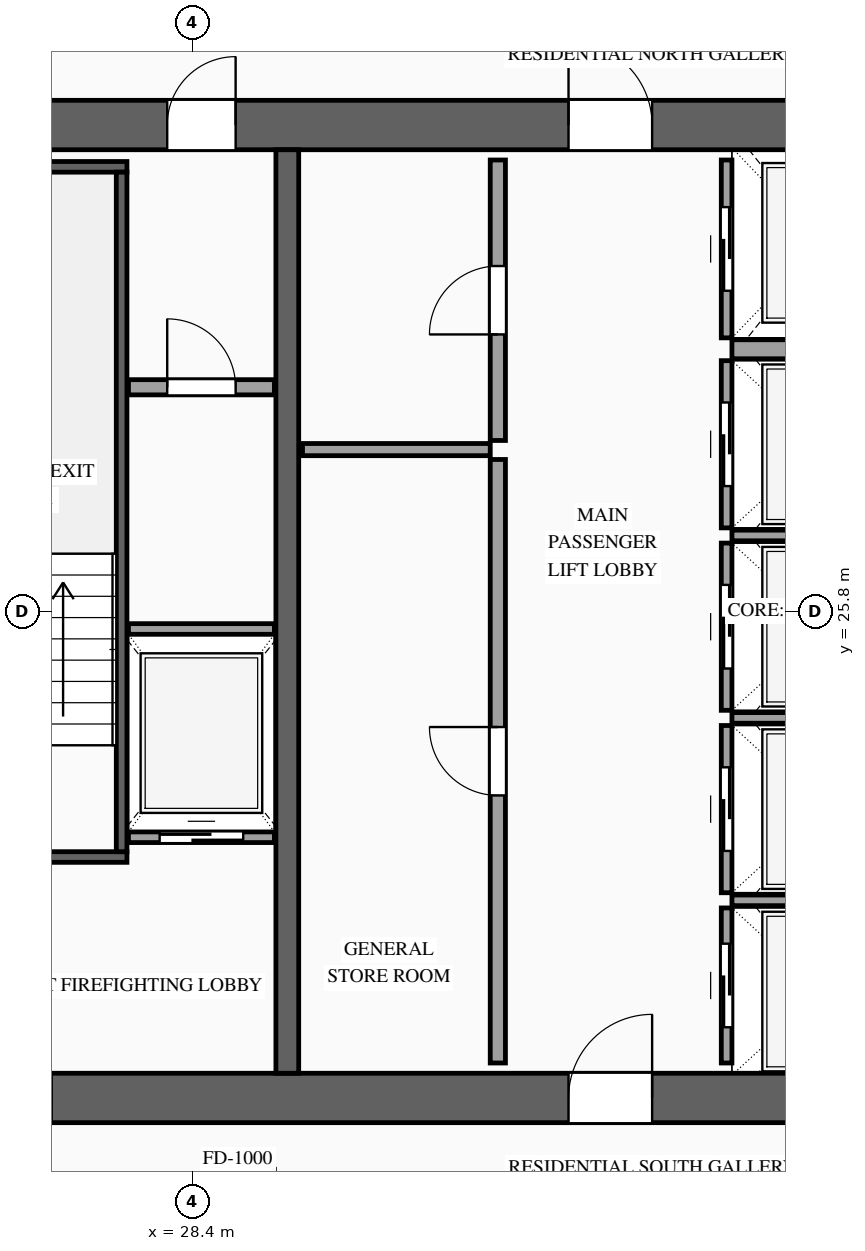
"""IFC4 building model, lengths in metres.
Left out: names, types, materials, properties, quantities, classifications, styles, units other than length and angle.
Written with IfcOpenShell. Run it as: python <this file> out.ifc"""

import sys

from ifc_helpers import new_model, si_unit, direction, frame, frame_2d, origin, place, context, subcontext, project, spatial, rectangle, extrude, source, transform, mapped, element, fill, save


model = new_model("IFC4")
c1 = context("Model", 3, precision=1e-05, world=origin(), true_north=direction((0.0, 1.0)))
c2 = subcontext(c1, "Body", "Model", "MODEL_VIEW")
j1 = project(units=[si_unit("LENGTHUNIT", "METRE"), si_unit("PLANEANGLEUNIT", "RADIAN")], contexts=[c1])
p1 = place(None, origin())
s1 = spatial("IfcSite", under=j1, at=p1, CompositionType="ELEMENT")
p2 = place(p1, origin())
s2 = spatial("IfcBuilding", under=s1, at=p2, CompositionType="ELEMENT")
p3 = place(p2, frame((0.0, 0.0, 191.5)))
s3 = spatial("IfcBuildingStorey", under=s2, at=p3, CompositionType="ELEMENT", Elevation=191.5)
p4 = place(p3, frame((23.475, 19.4, 0.0), z_axis=(0.0, 0.0, 1.0), x_axis=(1.0, 0.0, 0.0)))
e1 = element("IfcWall", 1, at=p4, inside=s3, PredefinedType="SHEAR", context=c2, shape_type="SweptSolid", body=[
    extrude(rectangle(XDim=27.05, YDim=0.65, at=frame_2d((13.525, 0.0))), origin(), (0.0, 0.0, 1.0), 3.5),
])
p5 = place(p4, frame((1.975, 0.0, 0.0)))
e2 = element("IfcOpeningElement", 2, at=p5, cuts=e1, PredefinedType="OPENING", context=c2, shape_type="SweptSolid", body=[
    extrude(rectangle(XDim=1.1, YDim=2.2, at=frame_2d((0.55, 1.1))), frame((0.0, 0.34, 0.0), z_axis=(0.0, -1.0, 0.0), x_axis=(1.0, 0.0, 0.0)), (0.0, 0.0, 1.0), 0.68),
])
p6 = place(p4, frame((9.875, 0.0, 0.0)))
e3 = element("IfcOpeningElement", 3, at=p6, cuts=e1, PredefinedType="OPENING", context=c2, shape_type="SweptSolid", body=[
    extrude(rectangle(XDim=1.1, YDim=2.2, at=frame_2d((0.55, 1.1))), frame((0.0, 0.34, 0.0), z_axis=(0.0, -1.0, 0.0), x_axis=(1.0, 0.0, 0.0)), (0.0, 0.0, 1.0), 0.68),
])
p7 = place(p4, frame((23.075, 0.0, 0.0)))
e4 = element("IfcOpeningElement", 4, at=p7, cuts=e1, PredefinedType="OPENING", context=c2, shape_type="SweptSolid", body=[
    extrude(rectangle(XDim=1.1, YDim=2.2, at=frame_2d((0.55, 1.1))), frame((0.0, 0.34, 0.0), z_axis=(0.0, -1.0, 0.0), x_axis=(1.0, 0.0, 0.0)), (0.0, 0.0, 1.0), 0.68),
])
p8 = place(p4, frame((19.695, 0.0, 0.0)))
e5 = element("IfcOpeningElement", 5, at=p8, cuts=e1, PredefinedType="OPENING", context=c2, shape_type="SweptSolid", body=[
    extrude(rectangle(XDim=0.9, YDim=2.15, at=frame_2d((0.45, 1.075))), frame((0.0, 0.34, 0.0), z_axis=(0.0, -1.0, 0.0), x_axis=(1.0, 0.0, 0.0)), (0.0, 0.0, 1.0), 0.68),
])
p9 = place(p4, frame((18.255, 0.0, 0.0)))
e6 = element("IfcOpeningElement", 6, at=p9, cuts=e1, PredefinedType="OPENING", context=c2, shape_type="SweptSolid", body=[
    extrude(rectangle(XDim=0.9, YDim=2.15, at=frame_2d((0.45, 1.075))), frame((0.0, 0.34, 0.0), z_axis=(0.0, -1.0, 0.0), x_axis=(1.0, 0.0, 0.0)), (0.0, 0.0, 1.0), 0.68),
])
p10 = place(p3, frame((23.475, 32.2, 0.0), z_axis=(0.0, 0.0, 1.0), x_axis=(1.0, 0.0, 0.0)))
e7 = element("IfcWall", 7, at=p10, inside=s3, PredefinedType="SHEAR", context=c2, shape_type="SweptSolid", body=[
    extrude(rectangle(XDim=27.05, YDim=0.65, at=frame_2d((13.525, 0.0))), origin(), (0.0, 0.0, 1.0), 3.5),
])
p11 = place(p10, frame((4.595, 0.0, 0.0)))
e8 = element("IfcOpeningElement", 8, at=p11, cuts=e7, PredefinedType="OPENING", context=c2, shape_type="SweptSolid", body=[
    extrude(rectangle(XDim=0.9, YDim=2.15, at=frame_2d((0.45, 1.075))), frame((0.0, 0.34, 0.0), z_axis=(0.0, -1.0, 0.0), x_axis=(1.0, 0.0, 0.0)), (0.0, 0.0, 1.0), 0.68),
])
p12 = place(p10, frame((9.875, 0.0, 0.0)))
e9 = element("IfcOpeningElement", 9, at=p12, cuts=e7, PredefinedType="OPENING", context=c2, shape_type="SweptSolid", body=[
    extrude(rectangle(XDim=1.1, YDim=2.2, at=frame_2d((0.55, 1.1))), frame((0.0, 0.34, 0.0), z_axis=(0.0, -1.0, 0.0), x_axis=(1.0, 0.0, 0.0)), (0.0, 0.0, 1.0), 0.68),
])
p13 = place(p10, frame((15.725, 0.0, 0.0)))
e10 = element("IfcOpeningElement", 10, at=p13, cuts=e7, PredefinedType="OPENING", context=c2, shape_type="SweptSolid", body=[
    extrude(rectangle(XDim=1.1, YDim=2.2, at=frame_2d((0.55, 1.1))), frame((0.0, 0.34, 0.0), z_axis=(0.0, -1.0, 0.0), x_axis=(1.0, 0.0, 0.0)), (0.0, 0.0, 1.0), 0.68),
])
p14 = place(p10, frame((18.255, 0.0, 0.0)))
e11 = element("IfcOpeningElement", 11, at=p14, cuts=e7, PredefinedType="OPENING", context=c2, shape_type="SweptSolid", body=[
    extrude(rectangle(XDim=0.9, YDim=2.15, at=frame_2d((0.45, 1.075))), frame((0.0, 0.34, 0.0), z_axis=(0.0, -1.0, 0.0), x_axis=(1.0, 0.0, 0.0)), (0.0, 0.0, 1.0), 0.68),
])
p15 = place(p10, frame((19.695, 0.0, 0.0)))
e12 = element("IfcOpeningElement", 12, at=p15, cuts=e7, PredefinedType="OPENING", context=c2, shape_type="SweptSolid", body=[
    extrude(rectangle(XDim=0.9, YDim=2.15, at=frame_2d((0.45, 1.075))), frame((0.0, 0.34, 0.0), z_axis=(0.0, -1.0, 0.0), x_axis=(1.0, 0.0, 0.0)), (0.0, 0.0, 1.0), 0.68),
])
m1 = source(origin(), c2, "Body", "SweptSolid", [
    extrude(rectangle(XDim=12.15, YDim=0.3, at=frame_2d((6.075, 0.0))), origin(), (0.0, 0.0, 1.0), 3.5),
])
p16 = place(p3, frame((29.65, 19.725, 0.0), z_axis=(0.0, 0.0, 1.0), x_axis=(0.0, 1.0, 0.0)))
e13 = element("IfcWall", 13, at=p16, inside=s3, PredefinedType="SOLIDWALL", context=c2, shape_type="MappedRepresentation", body=[
    mapped(m1, transform((0.0, 0.0, 0.0), scale=1.0)),
])
p17 = place(p3, frame((27.56, 22.83, 0.0), z_axis=(0.0, 0.0, 1.0), x_axis=(1.0, 0.0, 0.0)))
e14 = element("IfcWall", 14, at=p17, inside=s3, PredefinedType="SOLIDWALL", context=c2, shape_type="SweptSolid", body=[
    extrude(rectangle(XDim=1.92, YDim=0.14, at=frame_2d((0.96, 0.0))), origin(), (0.0, 0.0, 1.0), 3.28),
])
p18 = place(p17, frame((0.41, 0.0, 0.0)))
e15 = element("IfcOpeningElement", 15, at=p18, cuts=e14, PredefinedType="OPENING", context=c2, shape_type="SweptSolid", body=[
    extrude(rectangle(XDim=1.1, YDim=2.2, at=frame_2d((0.55, 1.1))), frame((0.0, 0.085, 0.0), z_axis=(0.0, -1.0, 0.0), x_axis=(1.0, 0.0, 0.0)), (0.0, 0.0, 1.0), 0.17),
])
m2 = source(origin(), c2, "Body", "SweptSolid", [
    extrude(rectangle(XDim=1.92, YDim=0.14, at=frame_2d((0.96, 0.0))), origin(), (0.0, 0.0, 1.0), 3.28),
])
p19 = place(p3, frame((27.56, 25.57, 0.0), z_axis=(0.0, 0.0, 1.0), x_axis=(1.0, 0.0, 0.0)))
e16 = element("IfcWall", 16, at=p19, inside=s3, PredefinedType="SOLIDWALL", context=c2, shape_type="MappedRepresentation", body=[
    mapped(m2, transform((0.0, 0.0, 0.0), scale=1.0)),
])
p20 = place(p3, frame((35.43, 19.86, 0.0), z_axis=(0.0, 0.0, 1.0), x_axis=(0.0, 1.0, 0.0)))
e17 = element("IfcWall", 17, at=p20, inside=s3, PredefinedType="SOLIDWALL", context=c2, shape_type="SweptSolid", body=[
    extrude(rectangle(XDim=2.04, YDim=0.14, at=frame_2d((1.02, 0.0))), origin(), (0.0, 0.0, 1.0), 3.28),
])
p21 = place(p20, frame((0.47, 0.0, 0.0)))
e18 = element("IfcOpeningElement", 18, at=p21, cuts=e17, PredefinedType="OPENING", context=c2, shape_type="SweptSolid", body=[
    extrude(rectangle(XDim=1.1, YDim=2.2, at=frame_2d((0.55, 1.1))), frame((0.0, 0.085, 0.0), z_axis=(0.0, -1.0, 0.0), x_axis=(1.0, 0.0, 0.0)), (0.0, 0.0, 1.0), 0.17),
])
m3 = source(origin(), c2, "Body", "SweptSolid", [
    extrude(rectangle(XDim=2.4, YDim=0.14, at=frame_2d((1.2, 0.0))), origin(), (0.0, 0.0, 1.0), 3.28),
])
p22 = place(p3, frame((35.5, 22.0, 0.0), z_axis=(0.0, 0.0, 1.0), x_axis=(1.0, 0.0, 0.0)))
e19 = element("IfcWall", 19, at=p22, inside=s3, PredefinedType="SOLIDWALL", context=c2, shape_type="MappedRepresentation", body=[
    mapped(m3, transform((0.0, 0.0, 0.0), scale=1.0)),
])
p23 = place(p3, frame((35.43, 22.1, 0.0), z_axis=(0.0, 0.0, 1.0), x_axis=(0.0, 1.0, 0.0)))
e20 = element("IfcWall", 20, at=p23, inside=s3, PredefinedType="SOLIDWALL", context=c2, shape_type="SweptSolid", body=[
    extrude(rectangle(XDim=2.2, YDim=0.14, at=frame_2d((1.1, 0.0))), origin(), (0.0, 0.0, 1.0), 3.28),
])
p24 = place(p23, frame((0.55, 0.0, 0.0)))
e21 = element("IfcOpeningElement", 21, at=p24, cuts=e20, PredefinedType="OPENING", context=c2, shape_type="SweptSolid", body=[
    extrude(rectangle(XDim=1.1, YDim=2.2, at=frame_2d((0.55, 1.1))), frame((0.0, 0.085, 0.0), z_axis=(0.0, -1.0, 0.0), x_axis=(1.0, 0.0, 0.0)), (0.0, 0.0, 1.0), 0.17),
])
p25 = place(p3, frame((35.5, 24.4, 0.0), z_axis=(0.0, 0.0, 1.0), x_axis=(1.0, 0.0, 0.0)))
e22 = element("IfcWall", 22, at=p25, inside=s3, PredefinedType="SOLIDWALL", context=c2, shape_type="MappedRepresentation", body=[
    mapped(m3, transform((0.0, 0.0, 0.0), scale=1.0)),
])
p26 = place(p3, frame((35.43, 24.5, 0.0), z_axis=(0.0, 0.0, 1.0), x_axis=(0.0, 1.0, 0.0)))
e23 = element("IfcWall", 23, at=p26, inside=s3, PredefinedType="SOLIDWALL", context=c2, shape_type="SweptSolid", body=[
    extrude(rectangle(XDim=2.2, YDim=0.14, at=frame_2d((1.1, 0.0))), origin(), (0.0, 0.0, 1.0), 3.28),
])
p27 = place(p26, frame((0.55, 0.0, 0.0)))
e24 = element("IfcOpeningElement", 24, at=p27, cuts=e23, PredefinedType="OPENING", context=c2, shape_type="SweptSolid", body=[
    extrude(rectangle(XDim=1.1, YDim=2.2, at=frame_2d((0.55, 1.1))), frame((0.0, 0.085, 0.0), z_axis=(0.0, -1.0, 0.0), x_axis=(1.0, 0.0, 0.0)), (0.0, 0.0, 1.0), 0.17),
])
p28 = place(p3, frame((35.5, 26.8, 0.0), z_axis=(0.0, 0.0, 1.0), x_axis=(1.0, 0.0, 0.0)))
e25 = element("IfcWall", 25, at=p28, inside=s3, PredefinedType="SOLIDWALL", context=c2, shape_type="MappedRepresentation", body=[
    mapped(m3, transform((0.0, 0.0, 0.0), scale=1.0)),
])
p29 = place(p3, frame((35.43, 26.9, 0.0), z_axis=(0.0, 0.0, 1.0), x_axis=(0.0, 1.0, 0.0)))
e26 = element("IfcWall", 26, at=p29, inside=s3, PredefinedType="SOLIDWALL", context=c2, shape_type="SweptSolid", body=[
    extrude(rectangle(XDim=2.2, YDim=0.14, at=frame_2d((1.1, 0.0))), origin(), (0.0, 0.0, 1.0), 3.28),
])
p30 = place(p29, frame((0.55, 0.0, 0.0)))
e27 = element("IfcOpeningElement", 27, at=p30, cuts=e26, PredefinedType="OPENING", context=c2, shape_type="SweptSolid", body=[
    extrude(rectangle(XDim=1.1, YDim=2.2, at=frame_2d((0.55, 1.1))), frame((0.0, 0.085, 0.0), z_axis=(0.0, -1.0, 0.0), x_axis=(1.0, 0.0, 0.0)), (0.0, 0.0, 1.0), 0.17),
])
p31 = place(p3, frame((35.43, 29.4, 0.0), z_axis=(0.0, 0.0, 1.0), x_axis=(0.0, 1.0, 0.0)))
e28 = element("IfcWall", 28, at=p31, inside=s3, PredefinedType="SOLIDWALL", context=c2, shape_type="SweptSolid", body=[
    extrude(rectangle(XDim=2.34, YDim=0.14, at=frame_2d((1.17, 0.0))), origin(), (0.0, 0.0, 1.0), 3.28),
])
p32 = place(p31, frame((0.62, 0.0, 0.0)))
e29 = element("IfcOpeningElement", 29, at=p32, cuts=e28, PredefinedType="OPENING", context=c2, shape_type="SweptSolid", body=[
    extrude(rectangle(XDim=1.1, YDim=2.2, at=frame_2d((0.55, 1.1))), frame((0.0, 0.085, 0.0), z_axis=(0.0, -1.0, 0.0), x_axis=(1.0, 0.0, 0.0)), (0.0, 0.0, 1.0), 0.17),
])
m4 = source(origin(), c2, "Body", "SweptSolid", [
    extrude(rectangle(XDim=2.4, YDim=0.25, at=frame_2d((1.2, 0.0))), origin(), (0.0, 0.0, 1.0), 3.28),
])
p33 = place(p3, frame((35.5, 29.25, 0.0), z_axis=(0.0, 0.0, 1.0), x_axis=(1.0, 0.0, 0.0)))
e30 = element("IfcWall", 30, at=p33, inside=s3, PredefinedType="SOLIDWALL", context=c2, shape_type="MappedRepresentation", body=[
    mapped(m4, transform((0.0, 0.0, 0.0), scale=1.0)),
])
p34 = place(p3, frame((24.26, 22.57, 0.0), z_axis=(0.0, 0.0, 1.0), x_axis=(1.0, 0.0, 0.0)))
e31 = element("IfcWall", 31, at=p34, inside=s3, PredefinedType="SOLIDWALL", context=c2, shape_type="SweptSolid", body=[
    extrude(rectangle(XDim=3.28, YDim=0.14, at=frame_2d((1.64, 0.0))), origin(), (0.0, 0.0, 1.0), 3.28),
])
p35 = place(p34, frame((1.09, 0.0, 0.0)))
e32 = element("IfcOpeningElement", 32, at=p35, cuts=e31, PredefinedType="OPENING", context=c2, shape_type="SweptSolid", body=[
    extrude(rectangle(XDim=1.1, YDim=2.2, at=frame_2d((0.55, 1.1))), frame((0.0, 0.085, 0.0), z_axis=(0.0, -1.0, 0.0), x_axis=(1.0, 0.0, 0.0)), (0.0, 0.0, 1.0), 0.17),
])
m5 = source(origin(), c2, "Body", "SweptSolid", [
    extrude(rectangle(XDim=3.28, YDim=0.14, at=frame_2d((1.64, 0.0))), origin(), (0.0, 0.0, 1.0), 3.28),
])
p36 = place(p3, frame((24.26, 31.65, 0.0), z_axis=(0.0, 0.0, 1.0), x_axis=(1.0, 0.0, 0.0)))
e33 = element("IfcWall", 33, at=p36, inside=s3, PredefinedType="SOLIDWALL", context=c2, shape_type="MappedRepresentation", body=[
    mapped(m5, transform((0.0, 0.0, 0.0), scale=1.0)),
])
m6 = source(origin(), c2, "Body", "SweptSolid", [
    extrude(rectangle(XDim=8.94, YDim=0.14, at=frame_2d((4.47, 0.0))), origin(), (0.0, 0.0, 1.0), 3.28),
])
p37 = place(p3, frame((27.47, 22.64, 0.0), z_axis=(0.0, 0.0, 1.0), x_axis=(0.0, 1.0, 0.0)))
e34 = element("IfcWall", 34, at=p37, inside=s3, PredefinedType="SOLIDWALL", context=c2, shape_type="MappedRepresentation", body=[
    mapped(m6, transform((0.0, 0.0, 0.0), scale=1.0)),
])
p38 = place(p3, frame((27.56, 28.75, 0.0), z_axis=(0.0, 0.0, 1.0), x_axis=(1.0, 0.0, 0.0)))
e35 = element("IfcWall", 35, at=p38, inside=s3, PredefinedType="PARTITIONING", context=c2, shape_type="SweptSolid", body=[
    extrude(rectangle(XDim=1.92, YDim=0.2, at=frame_2d((0.96, 0.0))), origin(), (0.0, 0.0, 1.0), 3.28),
])
p39 = place(p38, frame((0.51, 0.0, 0.0)))
e36 = element("IfcOpeningElement", 36, at=p39, cuts=e35, PredefinedType="OPENING", context=c2, shape_type="SweptSolid", body=[
    extrude(rectangle(XDim=0.9, YDim=2.15, at=frame_2d((0.45, 1.075))), frame((0.0, 0.115, 0.0), z_axis=(0.0, -1.0, 0.0), x_axis=(1.0, 0.0, 0.0)), (0.0, 0.0, 1.0), 0.23),
])
p40 = place(p3, frame((32.42, 19.86, 0.0), z_axis=(0.0, 0.0, 1.0), x_axis=(0.0, 1.0, 0.0)))
e37 = element("IfcWall", 37, at=p40, inside=s3, PredefinedType="PARTITIONING", context=c2, shape_type="SweptSolid", body=[
    extrude(rectangle(XDim=7.94, YDim=0.2, at=frame_2d((3.97, 0.0))), origin(), (0.0, 0.0, 1.0), 3.28),
])
p41 = place(p40, frame((3.52, 0.0, 0.0)))
e38 = element("IfcOpeningElement", 38, at=p41, cuts=e37, PredefinedType="OPENING", context=c2, shape_type="SweptSolid", body=[
    extrude(rectangle(XDim=0.9, YDim=2.15, at=frame_2d((0.45, 1.075))), frame((0.0, 0.115, 0.0), z_axis=(0.0, -1.0, 0.0), x_axis=(1.0, 0.0, 0.0)), (0.0, 0.0, 1.0), 0.23),
])
p42 = place(p3, frame((32.42, 28.05, 0.0), z_axis=(0.0, 0.0, 1.0), x_axis=(0.0, 1.0, 0.0)))
e39 = element("IfcWall", 39, at=p42, inside=s3, PredefinedType="PARTITIONING", context=c2, shape_type="SweptSolid", body=[
    extrude(rectangle(XDim=3.69, YDim=0.2, at=frame_2d((1.845, 0.0))), origin(), (0.0, 0.0, 1.0), 3.28),
])
p43 = place(p42, frame((1.395, 0.0, 0.0)))
e40 = element("IfcOpeningElement", 40, at=p43, cuts=e39, PredefinedType="OPENING", context=c2, shape_type="SweptSolid", body=[
    extrude(rectangle(XDim=0.9, YDim=2.15, at=frame_2d((0.45, 1.075))), frame((0.0, 0.115, 0.0), z_axis=(0.0, -1.0, 0.0), x_axis=(1.0, 0.0, 0.0)), (0.0, 0.0, 1.0), 0.23),
])
m7 = source(origin(), c2, "Body", "SweptSolid", [
    extrude(rectangle(XDim=2.47, YDim=0.16, at=frame_2d((1.235, 0.0))), origin(), (0.0, 0.0, 1.0), 3.28),
])
p44 = place(p3, frame((29.85, 27.93, 0.0), z_axis=(0.0, 0.0, 1.0), x_axis=(1.0, 0.0, 0.0)))
e41 = element("IfcWall", 41, at=p44, inside=s3, PredefinedType="PARTITIONING", context=c2, shape_type="MappedRepresentation", body=[
    mapped(m7, transform((0.0, 0.0, 0.0), scale=1.0)),
])
m8 = source(origin(), c2, "Body", "SweptSolid", [
    extrude(rectangle(XDim=1.1, YDim=2.2, at=frame_2d((0.55, 1.1))), frame((0.0, 0.025, 0.0), z_axis=(0.0, -1.0, 0.0), x_axis=(1.0, 0.0, 0.0)), (0.0, 0.0, 1.0), 0.05),
])
p45 = place(p18, origin())
e42 = element("IfcDoor", 42, at=p45, inside=s3, OperationType="SLIDING_TO_LEFT", PredefinedType="DOOR", context=c2, shape_type="MappedRepresentation", body=[
    mapped(m8, transform((0.0, 0.0, 0.0), scale=1.0)),
])
fill(e15, e42)
p46 = place(p21, origin())
e43 = element("IfcDoor", 43, at=p46, inside=s3, OperationType="SLIDING_TO_RIGHT", PredefinedType="DOOR", context=c2, shape_type="MappedRepresentation", body=[
    mapped(m8, transform((0.0, 0.0, 0.0), scale=1.0)),
])
fill(e18, e43)
p47 = place(p24, origin())
e44 = element("IfcDoor", 44, at=p47, inside=s3, OperationType="SLIDING_TO_LEFT", PredefinedType="DOOR", context=c2, shape_type="MappedRepresentation", body=[
    mapped(m8, transform((0.0, 0.0, 0.0), scale=1.0)),
])
fill(e21, e44)
p48 = place(p27, origin())
e45 = element("IfcDoor", 45, at=p48, inside=s3, OperationType="SLIDING_TO_RIGHT", PredefinedType="DOOR", context=c2, shape_type="MappedRepresentation", body=[
    mapped(m8, transform((0.0, 0.0, 0.0), scale=1.0)),
])
fill(e24, e45)
p49 = place(p30, origin())
e46 = element("IfcDoor", 46, at=p49, inside=s3, OperationType="SLIDING_TO_LEFT", PredefinedType="DOOR", context=c2, shape_type="MappedRepresentation", body=[
    mapped(m8, transform((0.0, 0.0, 0.0), scale=1.0)),
])
fill(e27, e46)
p50 = place(p32, origin())
e47 = element("IfcDoor", 47, at=p50, inside=s3, OperationType="SLIDING_TO_RIGHT", PredefinedType="DOOR", context=c2, shape_type="MappedRepresentation", body=[
    mapped(m8, transform((0.0, 0.0, 0.0), scale=1.0)),
])
fill(e29, e47)
m9 = source(origin(), c2, "Body", "SweptSolid", [
    extrude(rectangle(XDim=1.1, YDim=2.2, at=frame_2d((0.55, 1.1))), frame((0.0, 0.025, 0.0), z_axis=(0.0, -1.0, 0.0), x_axis=(1.0, 0.0, 0.0)), (0.0, 0.0, 1.0), 0.05),
])
p51 = place(p6, origin())
e48 = element("IfcDoor", 48, at=p51, inside=s3, OperationType="SINGLE_SWING_RIGHT", PredefinedType="DOOR", context=c2, shape_type="MappedRepresentation", body=[
    mapped(m9, transform((0.0, 0.0, 0.0), scale=1.0)),
])
fill(e3, e48)
m10 = source(origin(), c2, "Body", "SweptSolid", [
    extrude(rectangle(XDim=0.9, YDim=2.15, at=frame_2d((0.45, 1.075))), frame((0.0, 0.025, 0.0), z_axis=(0.0, -1.0, 0.0), x_axis=(1.0, 0.0, 0.0)), (0.0, 0.0, 1.0), 0.05),
])
p52 = place(p11, origin())
e49 = element("IfcDoor", 49, at=p52, inside=s3, OperationType="SINGLE_SWING_RIGHT", PredefinedType="DOOR", context=c2, shape_type="MappedRepresentation", body=[
    mapped(m10, transform((0.0, 0.0, 0.0), scale=1.0)),
])
fill(e8, e49)
p53 = place(p12, origin())
e50 = element("IfcDoor", 50, at=p53, inside=s3, OperationType="SINGLE_SWING_LEFT", PredefinedType="DOOR", context=c2, shape_type="MappedRepresentation", body=[
    mapped(m9, transform((0.0, 0.0, 0.0), scale=1.0)),
])
fill(e9, e50)
p54 = place(p39, origin())
e51 = element("IfcDoor", 51, at=p54, inside=s3, OperationType="SINGLE_SWING_LEFT", PredefinedType="DOOR", context=c2, shape_type="MappedRepresentation", body=[
    mapped(m10, transform((0.0, 0.0, 0.0), scale=1.0)),
])
fill(e36, e51)
p55 = place(p41, origin())
e52 = element("IfcDoor", 52, at=p55, inside=s3, OperationType="SINGLE_SWING_RIGHT", PredefinedType="DOOR", context=c2, shape_type="MappedRepresentation", body=[
    mapped(m10, transform((0.0, 0.0, 0.0), scale=1.0)),
])
fill(e38, e52)
p56 = place(p43, origin())
e53 = element("IfcDoor", 53, at=p56, inside=s3, OperationType="SINGLE_SWING_LEFT", PredefinedType="DOOR", context=c2, shape_type="MappedRepresentation", body=[
    mapped(m10, transform((0.0, 0.0, 0.0), scale=1.0)),
])
fill(e40, e53)
save(model, sys.argv[1])
